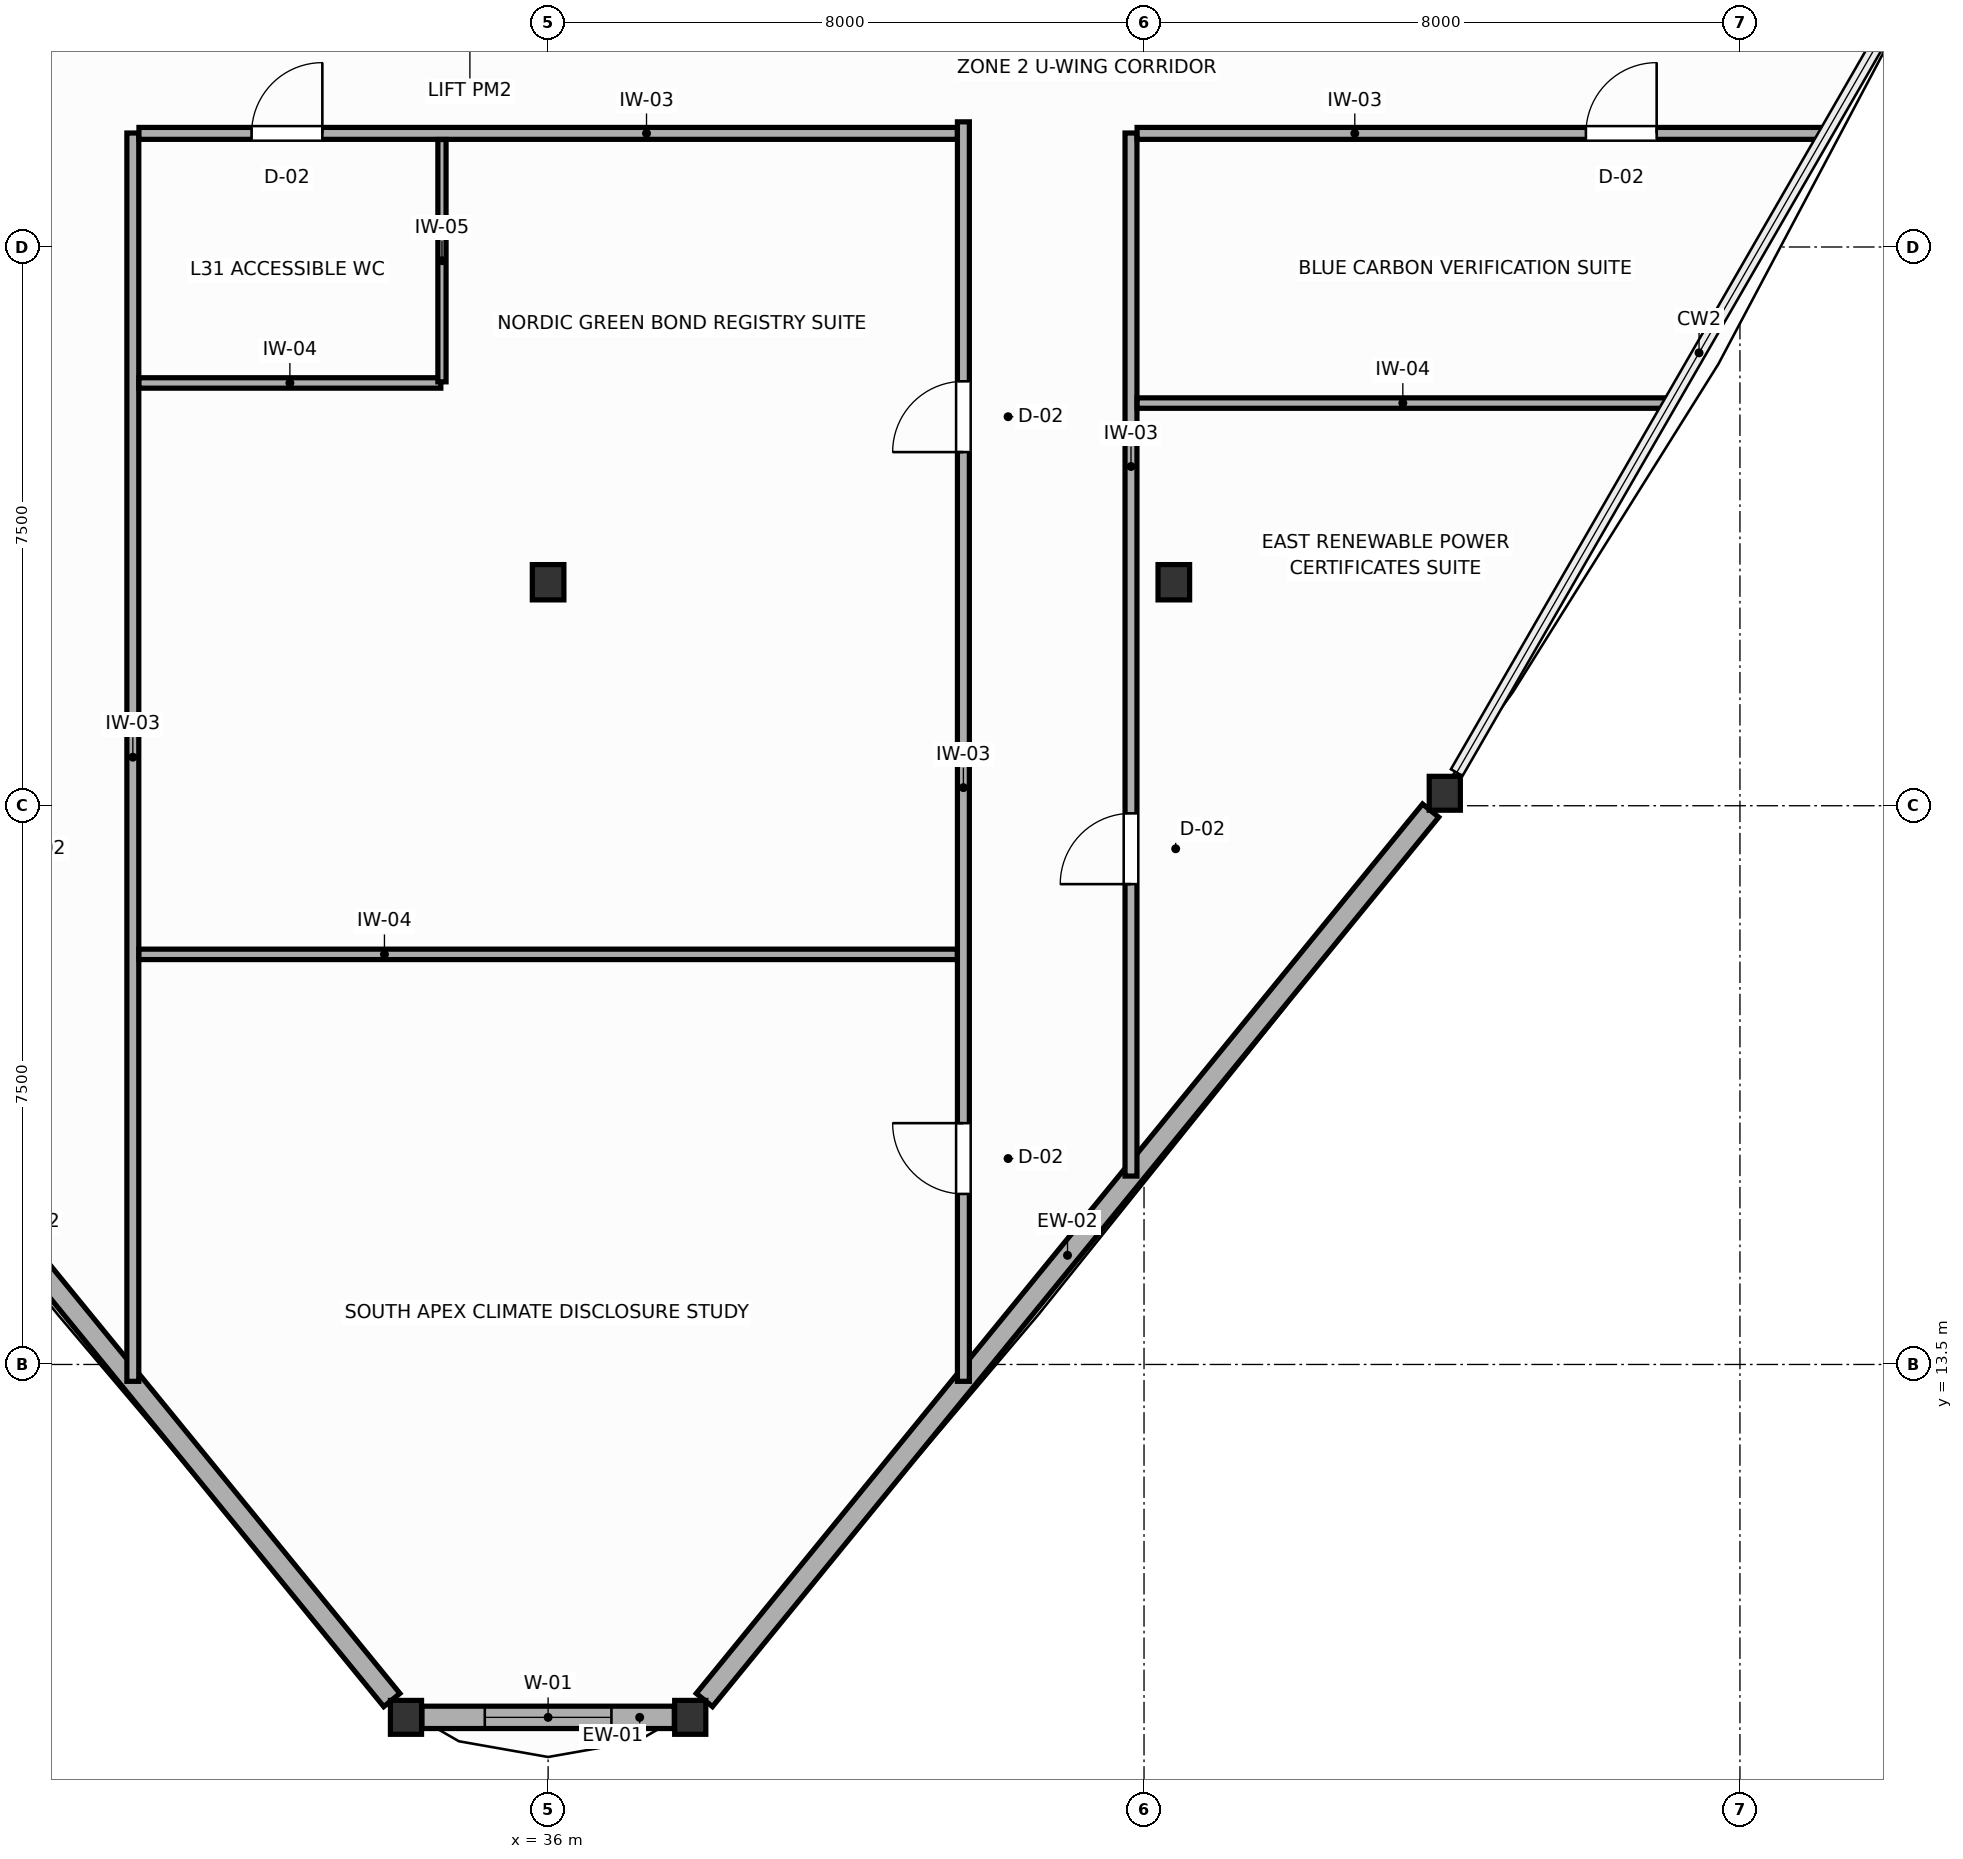
"""IFC4 building model, lengths in metres.
Left out: names, types, materials, properties, quantities, classifications, styles, units other than length and angle.
Written with IfcOpenShell. Run it as: python <this file> out.ifc"""

import sys

from ifc_helpers import new_model, si_unit, direction, frame, frame_2d, origin, origin_2d, place, context, subcontext, project, spatial, rectangle, i_section, extrude, source, transform, mapped, element, fill, save


model = new_model("IFC4")
c1 = context("Model", 3, precision=1e-05, world=origin(), true_north=direction((0.0, 1.0)))
c2 = subcontext(c1, "Body", "Model", "MODEL_VIEW")
j1 = project(units=[si_unit("LENGTHUNIT", "METRE"), si_unit("PLANEANGLEUNIT", "RADIAN")], contexts=[c1])
p1 = place(None, origin())
s1 = spatial("IfcSite", under=j1, at=p1, CompositionType="ELEMENT")
p2 = place(p1, origin())
s2 = spatial("IfcBuilding", under=s1, at=p2, CompositionType="ELEMENT")
p3 = place(p2, frame((0.0, 0.0, 124.2)))
s3 = spatial("IfcBuildingStorey", under=s2, at=p3, CompositionType="ELEMENT", Elevation=124.2)
m1 = source(origin(), c2, "Body", "SweptSolid", [
    extrude(i_section(OverallWidth=0.424, OverallDepth=0.474, WebThickness=0.045, FlangeThickness=0.072, FilletRadius=0.015, at=origin_2d()), origin(), (0.0, 0.0, 1.0), 3.6),
])
for number, where, z_axis, x_axis in (
    (1, (44.4, 24.0, 0.0), (0.0, 0.0, 1.0), (1.0, 0.0, 0.0)),
    (2, (36.0, 24.0, 0.0), (0.0, 0.0, 1.0), (1.0, 0.0, 0.0)),
):
    element("IfcColumn", number, at=place(p3, frame(where, z_axis=z_axis, x_axis=x_axis)), inside=s3, PredefinedType="COLUMN", context=c2, shape_type="MappedRepresentation", body=[
        mapped(m1, transform((0.0, 0.0, 0.0), scale=1.0)),
    ])
m2 = source(origin(), c2, "Body", "SweptSolid", [
    extrude(i_section(OverallWidth=0.418, OverallDepth=0.455, WebThickness=0.039, FlangeThickness=0.063, FilletRadius=0.015, at=origin_2d()), origin(), (0.0, 0.0, 1.0), 3.6),
])
for number, where, z_axis, x_axis in (
    (3, (34.092, 8.763, 0.0), (0.0, 0.0, 1.0), (1.0, 0.0, 0.0)),
    (4, (37.908, 8.763, 0.0), (0.0, 0.0, 1.0), (1.0, 0.0, 0.0)),
    (5, (48.038, 21.167, 0.0), (0.0, 0.0, 1.0), (1.0, 0.0, 0.0)),
):
    element("IfcColumn", number, at=place(p3, frame(where, z_axis=z_axis, x_axis=x_axis)), inside=s3, PredefinedType="COLUMN", context=c2, shape_type="MappedRepresentation", body=[
        mapped(m2, transform((0.0, 0.0, 0.0), scale=1.0)),
    ])
p4 = place(p3, frame((24.152, 20.935, 0.0), z_axis=(0.0, 0.0, 1.0), x_axis=(0.632511291832, -0.774551138211, 0.0)))
e6 = element("IfcWall", 6, at=p4, inside=s3, PredefinedType="SOLIDWALL", context=c2, shape_type="SweptSolid", body=[
    extrude(rectangle(XDim=15.414, YDim=0.28, at=frame_2d((7.707, 0.0))), origin(), (0.0, 0.0, 1.0), 3.0),
])
p5 = place(p3, frame((34.306, 8.763, 0.0), z_axis=(0.0, 0.0, 1.0), x_axis=(1.0, 0.0, 0.0)))
e7 = element("IfcWall", 7, at=p5, inside=s3, PredefinedType="SOLIDWALL", context=c2, shape_type="SweptSolid", body=[
    extrude(rectangle(XDim=3.388, YDim=0.3, at=frame_2d((1.694, 0.0))), origin(), (0.0, 0.0, 1.0), 3.0),
])
p6 = place(p5, frame((0.844, 0.0, 0.75)))
e8 = element("IfcOpeningElement", 8, at=p6, cuts=e7, PredefinedType="OPENING", context=c2, shape_type="SweptSolid", body=[
    extrude(rectangle(XDim=1.7, YDim=1.75, at=frame_2d((0.85, 0.875))), frame((0.0, 0.16, 0.0), z_axis=(0.0, -1.0, 0.0), x_axis=(1.0, 0.0, 0.0)), (0.0, 0.0, 1.0), 0.32),
])
p7 = place(p3, frame((38.098, 8.996, 0.0), z_axis=(0.0, 0.0, 1.0), x_axis=(0.632511291832, 0.774551138211, 0.0)))
e9 = element("IfcWall", 9, at=p7, inside=s3, PredefinedType="SOLIDWALL", context=c2, shape_type="SweptSolid", body=[
    extrude(rectangle(XDim=15.414, YDim=0.28, at=frame_2d((7.707, 0.0))), origin(), (0.0, 0.0, 1.0), 3.0),
])
p8 = place(p3, frame((41.575, 13.274, 0.0), z_axis=(0.0, 0.0, 1.0), x_axis=(0.0, 1.0, 0.0)))
e10 = element("IfcWall", 10, at=p8, inside=s3, PredefinedType="PARTITIONING", context=c2, shape_type="SweptSolid", body=[
    extrude(rectangle(XDim=16.906, YDim=0.16, at=frame_2d((8.453, 0.0))), origin(), (0.0, 0.0, 1.0), 3.4),
])
p9 = place(p8, frame((2.516, 0.0, 0.0)))
e11 = element("IfcOpeningElement", 11, at=p9, cuts=e10, PredefinedType="OPENING", context=c2, shape_type="SweptSolid", body=[
    extrude(rectangle(XDim=0.95, YDim=2.05, at=frame_2d((0.475, 1.025))), frame((0.0, 0.09, 0.0), z_axis=(0.0, -1.0, 0.0), x_axis=(1.0, 0.0, 0.0)), (0.0, 0.0, 1.0), 0.18),
])
p10 = place(p8, frame((12.473, 0.0, 0.0)))
e12 = element("IfcOpeningElement", 12, at=p10, cuts=e10, PredefinedType="OPENING", context=c2, shape_type="SweptSolid", body=[
    extrude(rectangle(XDim=0.95, YDim=2.05, at=frame_2d((0.475, 1.025))), frame((0.0, 0.09, 0.0), z_axis=(0.0, -1.0, 0.0), x_axis=(1.0, 0.0, 0.0)), (0.0, 0.0, 1.0), 0.18),
])
p11 = place(p3, frame((30.425, 13.274, 0.0), z_axis=(0.0, 0.0, 1.0), x_axis=(0.0, 1.0, 0.0)))
e13 = element("IfcWall", 13, at=p11, inside=s3, PredefinedType="PARTITIONING", context=c2, shape_type="SweptSolid", body=[
    extrude(rectangle(XDim=16.756, YDim=0.16, at=frame_2d((8.378, 0.0))), origin(), (0.0, 0.0, 1.0), 3.4),
])
p12 = place(p3, frame((43.825, 16.029, 0.0), z_axis=(0.0, 0.0, 1.0), x_axis=(0.0, 1.0, 0.0)))
e14 = element("IfcWall", 14, at=p12, inside=s3, PredefinedType="PARTITIONING", context=c2, shape_type="SweptSolid", body=[
    extrude(rectangle(XDim=14.001, YDim=0.16, at=frame_2d((7.0, 0.0))), origin(), (0.0, 0.0, 1.0), 3.0),
])
p13 = place(p12, frame((3.919, 0.0, 0.0)))
e15 = element("IfcOpeningElement", 15, at=p13, cuts=e14, PredefinedType="OPENING", context=c2, shape_type="SweptSolid", body=[
    extrude(rectangle(XDim=0.95, YDim=2.05, at=frame_2d((0.475, 1.025))), frame((0.0, 0.09, 0.0), z_axis=(0.0, -1.0, 0.0), x_axis=(1.0, 0.0, 0.0)), (0.0, 0.0, 1.0), 0.18),
])
p14 = place(p3, frame((30.507, 30.025, 0.0), z_axis=(0.0, 0.0, 1.0), x_axis=(1.0, 0.0, 0.0)))
e16 = element("IfcWall", 16, at=p14, inside=s3, PredefinedType="PARTITIONING", context=c2, shape_type="SweptSolid", body=[
    extrude(rectangle(XDim=10.986, YDim=0.16, at=frame_2d((5.493, 0.0))), origin(), (0.0, 0.0, 1.0), 3.4),
])
p15 = place(p14, frame((1.512, 0.0, 0.0)))
e17 = element("IfcOpeningElement", 17, at=p15, cuts=e16, PredefinedType="OPENING", context=c2, shape_type="SweptSolid", body=[
    extrude(rectangle(XDim=0.95, YDim=2.05, at=frame_2d((0.475, 1.025))), frame((0.0, 0.09, 0.0), z_axis=(0.0, -1.0, 0.0), x_axis=(1.0, 0.0, 0.0)), (0.0, 0.0, 1.0), 0.18),
])
p16 = place(p3, frame((43.907, 30.025, 0.0), z_axis=(0.0, 0.0, 1.0), x_axis=(1.0, 0.0, 0.0)))
e18 = element("IfcWall", 18, at=p16, inside=s3, PredefinedType="PARTITIONING", context=c2, shape_type="SweptSolid", body=[
    extrude(rectangle(XDim=9.225, YDim=0.16, at=frame_2d((4.612, 0.0))), origin(), (0.0, 0.0, 1.0), 3.4),
])
p17 = place(p16, frame((6.025, 0.0, 0.0)))
e19 = element("IfcOpeningElement", 19, at=p17, cuts=e18, PredefinedType="OPENING", context=c2, shape_type="SweptSolid", body=[
    extrude(rectangle(XDim=0.95, YDim=2.05, at=frame_2d((0.475, 1.025))), frame((0.0, 0.09, 0.0), z_axis=(0.0, -1.0, 0.0), x_axis=(1.0, 0.0, 0.0)), (0.0, 0.0, 1.0), 0.18),
])
p18 = place(p3, frame((30.507, 19.005, 0.0), z_axis=(0.0, 0.0, 1.0), x_axis=(1.0, 0.0, 0.0)))
e20 = element("IfcWall", 20, at=p18, inside=s3, PredefinedType="PARTITIONING", context=c2, shape_type="SweptSolid", body=[
    extrude(rectangle(XDim=10.986, YDim=0.14, at=frame_2d((5.493, 0.0))), origin(), (0.0, 0.0, 1.0), 3.4),
])
p19 = place(p3, frame((43.907, 26.405, 0.0), z_axis=(0.0, 0.0, 1.0), x_axis=(1.0, 0.0, 0.0)))
e21 = element("IfcWall", 21, at=p19, inside=s3, PredefinedType="PARTITIONING", context=c2, shape_type="SweptSolid", body=[
    extrude(rectangle(XDim=7.135, YDim=0.14, at=frame_2d((3.567, 0.0))), origin(), (0.0, 0.0, 1.0), 3.4),
])
p20 = place(p3, frame((30.507, 26.675, 0.0), z_axis=(0.0, 0.0, 1.0), x_axis=(1.0, 0.0, 0.0)))
e22 = element("IfcWall", 22, at=p20, inside=s3, PredefinedType="PARTITIONING", context=c2, shape_type="SweptSolid", body=[
    extrude(rectangle(XDim=4.053, YDim=0.14, at=frame_2d((2.026, 0.0))), origin(), (0.0, 0.0, 1.0), 3.4),
])
p21 = place(p3, frame((34.575, 26.69, 0.0), z_axis=(0.0, 0.0, 1.0), x_axis=(0.0, 1.0, 0.0)))
e23 = element("IfcWall", 23, at=p21, inside=s3, PredefinedType="MOVABLE", context=c2, shape_type="SweptSolid", body=[
    extrude(rectangle(XDim=3.253, YDim=0.11, at=frame_2d((1.626, 0.0))), origin(), (0.0, 0.0, 1.0), 3.4),
])
p22 = place(p6, origin())
e24 = element("IfcWindow", 24, at=p22, inside=s3, PartitioningType="SINGLE_PANEL", PredefinedType="WINDOW", context=c2, shape_type="SweptSolid", body=[
    extrude(rectangle(XDim=1.7, YDim=1.75, at=frame_2d((0.85, 0.875))), frame((0.0, 0.03, 0.0), z_axis=(0.0, -1.0, 0.0), x_axis=(1.0, 0.0, 0.0)), (0.0, 0.0, 1.0), 0.06),
])
fill(e8, e24)
p23 = place(p9, origin())
e25 = element("IfcDoor", 25, at=p23, inside=s3, OperationType="SINGLE_SWING_RIGHT", PredefinedType="DOOR", context=c2, shape_type="SweptSolid", body=[
    extrude(rectangle(XDim=0.95, YDim=2.05, at=frame_2d((0.475, 1.025))), frame((0.0, 0.025, 0.0), z_axis=(0.0, -1.0, 0.0), x_axis=(1.0, 0.0, 0.0)), (0.0, 0.0, 1.0), 0.05),
])
fill(e11, e25)
p24 = place(p10, origin())
e26 = element("IfcDoor", 26, at=p24, inside=s3, OperationType="SINGLE_SWING_LEFT", PredefinedType="DOOR", context=c2, shape_type="SweptSolid", body=[
    extrude(rectangle(XDim=0.95, YDim=2.05, at=frame_2d((0.475, 1.025))), frame((0.0, 0.025, 0.0), z_axis=(0.0, -1.0, 0.0), x_axis=(1.0, 0.0, 0.0)), (0.0, 0.0, 1.0), 0.05),
])
fill(e12, e26)
p25 = place(p13, origin())
e27 = element("IfcDoor", 27, at=p25, inside=s3, OperationType="SINGLE_SWING_LEFT", PredefinedType="DOOR", context=c2, shape_type="SweptSolid", body=[
    extrude(rectangle(XDim=0.95, YDim=2.05, at=frame_2d((0.475, 1.025))), frame((0.0, 0.025, 0.0), z_axis=(0.0, -1.0, 0.0), x_axis=(1.0, 0.0, 0.0)), (0.0, 0.0, 1.0), 0.05),
])
fill(e15, e27)
p26 = place(p15, origin())
e28 = element("IfcDoor", 28, at=p26, inside=s3, OperationType="SINGLE_SWING_RIGHT", PredefinedType="DOOR", context=c2, shape_type="SweptSolid", body=[
    extrude(rectangle(XDim=0.95, YDim=2.05, at=frame_2d((0.475, 1.025))), frame((0.0, 0.025, 0.0), z_axis=(0.0, -1.0, 0.0), x_axis=(1.0, 0.0, 0.0)), (0.0, 0.0, 1.0), 0.05),
])
fill(e17, e28)
p27 = place(p17, origin())
e29 = element("IfcDoor", 29, at=p27, inside=s3, OperationType="SINGLE_SWING_RIGHT", PredefinedType="DOOR", context=c2, shape_type="SweptSolid", body=[
    extrude(rectangle(XDim=0.95, YDim=2.05, at=frame_2d((0.475, 1.025))), frame((0.0, 0.025, 0.0), z_axis=(0.0, -1.0, 0.0), x_axis=(1.0, 0.0, 0.0)), (0.0, 0.0, 1.0), 0.05),
])
fill(e19, e29)
save(model, sys.argv[1])
